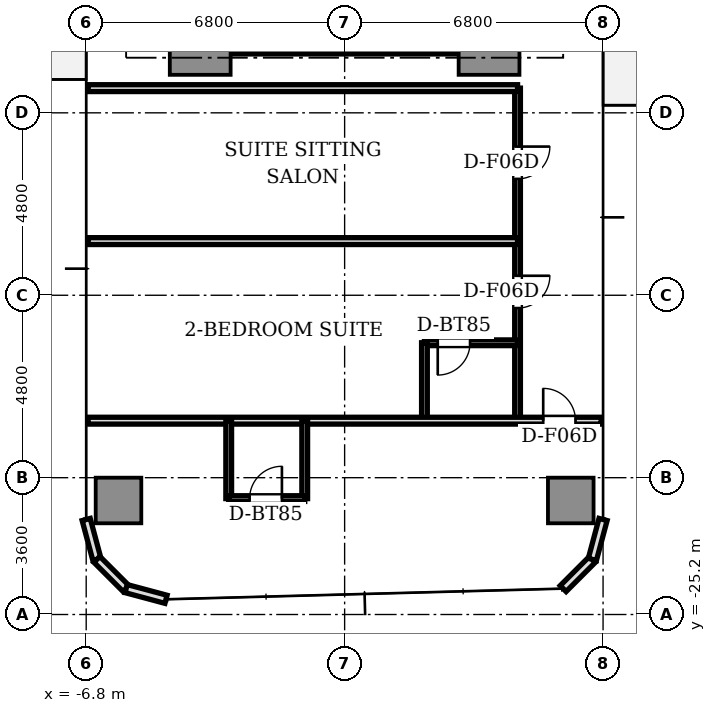
"""IFC4 building model, lengths in metres.
Left out: names, types, materials, properties, quantities, classifications, styles, units other than length and angle.
Written with IfcOpenShell. Run it as: python <this file> out.ifc"""

import sys

from ifc_helpers import new_model, si_unit, direction, frame, frame_2d, origin, origin_2d, place, context, subcontext, project, spatial, rectangle, extrude, source, transform, mapped, element, fill, save


model = new_model("IFC4")
c1 = context("Model", 3, precision=1e-05, world=origin(), true_north=direction((0.0, 1.0)))
c2 = subcontext(c1, "Body", "Model", "MODEL_VIEW")
j1 = project(units=[si_unit("LENGTHUNIT", "METRE"), si_unit("PLANEANGLEUNIT", "RADIAN")], contexts=[c1])
p1 = place(None, origin())
s1 = spatial("IfcSite", under=j1, at=p1, CompositionType="ELEMENT")
p2 = place(p1, origin())
s2 = spatial("IfcBuilding", under=s1, at=p2, CompositionType="ELEMENT")
p3 = place(p2, frame((0.0, 0.0, 29.8)))
s3 = spatial("IfcBuildingStorey", under=s2, at=p3, CompositionType="ELEMENT", Elevation=29.8)
p4 = place(p3, frame((-3.55, -10.2, 0.0), z_axis=(0.0, 0.0, 1.0), x_axis=(1.0, 0.0, 0.0)))
e1 = element("IfcWall", 1, at=p4, inside=s3, PredefinedType="SHEAR", context=c2, shape_type="SweptSolid", body=[
    extrude(rectangle(XDim=7.1, YDim=0.5, at=frame_2d((3.55, 0.0))), origin(), (0.0, 0.0, 1.0), 3.11),
])
m1 = source(origin(), c2, "Body", "SweptSolid", [
    extrude(rectangle(XDim=1.6, YDim=1.6, at=origin_2d()), origin(), (0.0, 0.0, 1.0), 3.11),
])
for number, where, z_axis, x_axis in (
    (2, (-3.8, -10.2, 0.0), (0.0, 0.0, 1.0), (1.0, 0.0, 0.0)),
    (3, (3.8, -10.2, 0.0), (0.0, 0.0, 1.0), (1.0, 0.0, 0.0)),
):
    element("IfcColumn", number, at=place(p3, frame(where, z_axis=z_axis, x_axis=x_axis)), inside=s3, PredefinedType="COLUMN", context=c2, shape_type="MappedRepresentation", body=[
        mapped(m1, transform((0.0, 0.0, 0.0), scale=1.0)),
    ])
m2 = source(origin(), c2, "Body", "SweptSolid", [
    extrude(rectangle(XDim=1.2, YDim=1.2, at=origin_2d()), origin(), (0.0, 0.0, 1.0), 3.11),
])
for number, where, z_axis, x_axis in (
    (4, (-5.95, -22.2, 0.0), (0.0, 0.0, 1.0), (1.0, 0.0, 0.0)),
    (5, (5.95, -22.2, 0.0), (0.0, 0.0, 1.0), (1.0, 0.0, 0.0)),
):
    element("IfcColumn", number, at=place(p3, frame(where, z_axis=z_axis, x_axis=x_axis)), inside=s3, PredefinedType="COLUMN", context=c2, shape_type="MappedRepresentation", body=[
        mapped(m2, transform((0.0, 0.0, 0.0), scale=1.0)),
    ])
for number, where, z_axis, x_axis in (
    (6, (-6.8, -22.7, 0.0), (0.0, 0.0, 1.0), (0.259, -0.966, 0.0)),
    (7, (-6.519, -23.75, 0.0), (0.0, 0.0, 1.0), (0.707, -0.707, 0.0)),
    (8, (-5.75, -24.519, 0.0), (0.0, 0.0, 1.0), (0.966, -0.259, 0.0)),
    (9, (5.75, -24.519, 0.0), (0.0, 0.0, 1.0), (0.707, 0.707, 0.0)),
    (10, (6.519, -23.75, 0.0), (0.0, 0.0, 1.0), (0.259, 0.966, 0.0)),
):
    element("IfcWall", number, at=place(p3, frame(where, z_axis=z_axis, x_axis=x_axis)), inside=s3, PredefinedType="STANDARD", context=c2, shape_type="SweptSolid", body=[
        extrude(rectangle(XDim=1.087, YDim=0.22, at=frame_2d((0.543, 0.0))), origin(), (0.0, 0.0, 1.0), 3.11),
    ])
p5 = place(p3, frame((4.55, -11.35, 0.0), z_axis=(0.0, 0.0, 1.0), x_axis=(0.0, -1.0, 0.0)))
e11 = element("IfcWall", 11, at=p5, inside=s3, PredefinedType="PARTITIONING", context=c2, shape_type="SweptSolid", body=[
    extrude(rectangle(XDim=8.75, YDim=0.15, at=frame_2d((4.375, 0.0))), origin(), (0.0, 0.0, 1.0), 2.63),
])
p6 = place(p5, frame((1.538, 0.0, 0.0)))
e12 = element("IfcOpeningElement", 12, at=p6, cuts=e11, PredefinedType="OPENING", context=c2, shape_type="SweptSolid", body=[
    extrude(rectangle(XDim=0.85, YDim=2.1, at=frame_2d((0.425, 1.05))), frame((0.0, 0.085, 0.0), z_axis=(0.0, -1.0, 0.0), x_axis=(1.0, 0.0, 0.0)), (0.0, 0.0, 1.0), 0.17),
])
p7 = place(p5, frame((4.937, 0.0, 0.0)))
e13 = element("IfcOpeningElement", 13, at=p7, cuts=e11, PredefinedType="OPENING", context=c2, shape_type="SweptSolid", body=[
    extrude(rectangle(XDim=0.85, YDim=2.1, at=frame_2d((0.425, 1.05))), frame((0.0, 0.085, 0.0), z_axis=(0.0, -1.0, 0.0), x_axis=(1.0, 0.0, 0.0)), (0.0, 0.0, 1.0), 0.17),
])
for number, where, z_axis, x_axis in (
    (14, (-6.75, -11.35, 0.0), (0.0, 0.0, 1.0), (1.0, 0.0, 0.0)),
    (15, (4.55, -15.375, 0.0), (0.0, 0.0, 1.0), (-1.0, 0.0, 0.0)),
):
    element("IfcWall", number, at=place(p3, frame(where, z_axis=z_axis, x_axis=x_axis)), inside=s3, PredefinedType="PARTITIONING", context=c2, shape_type="SweptSolid", body=[
        extrude(rectangle(XDim=11.3, YDim=0.18, at=frame_2d((5.65, 0.0))), origin(), (0.0, 0.0, 1.0), 2.66),
    ])
p8 = place(p3, frame((4.55, -18.05, 0.0), z_axis=(0.0, 0.0, 1.0), x_axis=(-1.0, 0.0, 0.0)))
e16 = element("IfcWall", 16, at=p8, inside=s3, PredefinedType="PARTITIONING", context=c2, shape_type="SweptSolid", body=[
    extrude(rectangle(XDim=2.45, YDim=0.15, at=frame_2d((1.225, 0.0))), origin(), (0.0, 0.0, 1.0), 2.66),
])
p9 = place(p8, frame((1.25, 0.0, 0.0)))
e17 = element("IfcOpeningElement", 17, at=p9, cuts=e16, PredefinedType="OPENING", context=c2, shape_type="SweptSolid", body=[
    extrude(rectangle(XDim=0.85, YDim=2.1, at=frame_2d((0.425, 1.05))), frame((0.0, 0.085, 0.0), z_axis=(0.0, -1.0, 0.0), x_axis=(1.0, 0.0, 0.0)), (0.0, 0.0, 1.0), 0.17),
])
p10 = place(p3, frame((2.1, -18.05, 0.0), z_axis=(0.0, 0.0, 1.0), x_axis=(0.0, -1.0, 0.0)))
e18 = element("IfcWall", 18, at=p10, inside=s3, PredefinedType="PARTITIONING", context=c2, shape_type="SweptSolid", body=[
    extrude(rectangle(XDim=2.05, YDim=0.15, at=frame_2d((1.025, 0.0))), origin(), (0.0, 0.0, 1.0), 2.66),
])
p11 = place(p3, frame((-6.75, -20.1, 0.0), z_axis=(0.0, 0.0, 1.0), x_axis=(1.0, 0.0, 0.0)))
e19 = element("IfcWall", 19, at=p11, inside=s3, PredefinedType="PARTITIONING", context=c2, shape_type="SweptSolid", body=[
    extrude(rectangle(XDim=13.5, YDim=0.18, at=frame_2d((6.75, 0.0))), origin(), (0.0, 0.0, 1.0), 2.66),
])
p12 = place(p11, frame((11.975, 0.0, 0.0)))
e20 = element("IfcOpeningElement", 20, at=p12, cuts=e19, PredefinedType="OPENING", context=c2, shape_type="SweptSolid", body=[
    extrude(rectangle(XDim=0.85, YDim=2.1, at=frame_2d((0.425, 1.05))), frame((0.0, 0.1, 0.0), z_axis=(0.0, -1.0, 0.0), x_axis=(1.0, 0.0, 0.0)), (0.0, 0.0, 1.0), 0.2),
])
for number, where, z_axis, x_axis in (
    (21, (-1.05, -20.1, 0.0), (0.0, 0.0, 1.0), (0.0, -1.0, 0.0)),
    (22, (-3.05, -20.1, 0.0), (0.0, 0.0, 1.0), (0.0, -1.0, 0.0)),
):
    element("IfcWall", number, at=place(p3, frame(where, z_axis=z_axis, x_axis=x_axis)), inside=s3, PredefinedType="PARTITIONING", context=c2, shape_type="SweptSolid", body=[
        extrude(rectangle(XDim=2.05, YDim=0.15, at=frame_2d((1.025, 0.0))), origin(), (0.0, 0.0, 1.0), 2.66),
    ])
p13 = place(p3, frame((-3.05, -22.15, 0.0), z_axis=(0.0, 0.0, 1.0), x_axis=(1.0, 0.0, 0.0)))
e23 = element("IfcWall", 23, at=p13, inside=s3, PredefinedType="PARTITIONING", context=c2, shape_type="SweptSolid", body=[
    extrude(rectangle(XDim=2.0, YDim=0.15, at=frame_2d((1.0, 0.0))), origin(), (0.0, 0.0, 1.0), 2.58),
])
p14 = place(p13, frame((0.55, 0.0, 0.0)))
e24 = element("IfcOpeningElement", 24, at=p14, cuts=e23, PredefinedType="OPENING", context=c2, shape_type="SweptSolid", body=[
    extrude(rectangle(XDim=0.85, YDim=2.1, at=frame_2d((0.425, 1.05))), frame((0.0, 0.085, 0.0), z_axis=(0.0, -1.0, 0.0), x_axis=(1.0, 0.0, 0.0)), (0.0, 0.0, 1.0), 0.17),
])
m3 = source(origin(), c2, "Body", "SweptSolid", [
    extrude(rectangle(XDim=0.85, YDim=0.05, at=origin_2d()), origin(), (0.0, 0.0, 1.0), 2.1),
])
p15 = place(p6, frame((0.425, 0.0, 0.0)))
e25 = element("IfcDoor", 25, at=p15, inside=s3, OperationType="SINGLE_SWING_LEFT", PredefinedType="DOOR", context=c2, shape_type="MappedRepresentation", body=[
    mapped(m3, transform((0.0, 0.0, 0.0), scale=1.0)),
])
fill(e12, e25)
p16 = place(p9, frame((0.425, 0.0, 0.0)))
e26 = element("IfcDoor", 26, at=p16, inside=s3, OperationType="SINGLE_SWING_RIGHT", PredefinedType="DOOR", context=c2, shape_type="MappedRepresentation", body=[
    mapped(m3, transform((0.0, 0.0, 0.0), scale=1.0)),
])
fill(e17, e26)
p17 = place(p7, frame((0.425, 0.0, 0.0)))
e27 = element("IfcDoor", 27, at=p17, inside=s3, OperationType="SINGLE_SWING_LEFT", PredefinedType="DOOR", context=c2, shape_type="MappedRepresentation", body=[
    mapped(m3, transform((0.0, 0.0, 0.0), scale=1.0)),
])
fill(e13, e27)
p18 = place(p14, frame((0.425, 0.0, 0.0)))
e28 = element("IfcDoor", 28, at=p18, inside=s3, OperationType="SINGLE_SWING_RIGHT", PredefinedType="DOOR", context=c2, shape_type="MappedRepresentation", body=[
    mapped(m3, transform((0.0, 0.0, 0.0), scale=1.0)),
])
fill(e24, e28)
p19 = place(p12, frame((0.425, 0.0, 0.0)))
e29 = element("IfcDoor", 29, at=p19, inside=s3, OperationType="SINGLE_SWING_LEFT", PredefinedType="DOOR", context=c2, shape_type="MappedRepresentation", body=[
    mapped(m3, transform((0.0, 0.0, 0.0), scale=1.0)),
])
fill(e20, e29)
save(model, sys.argv[1])
